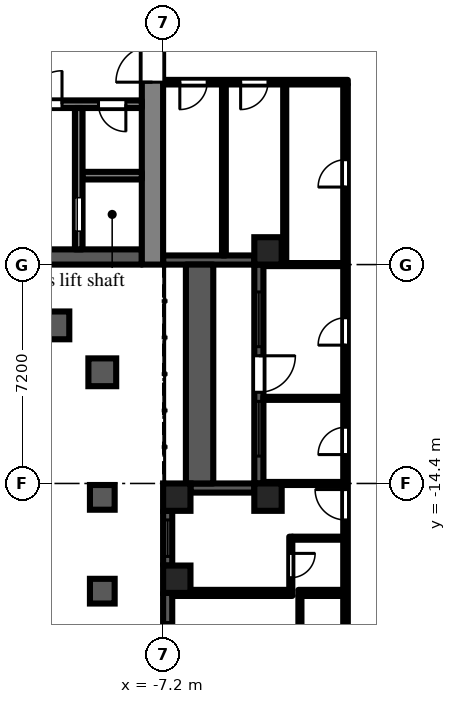
"""IFC4 building model, lengths in metres.
Left out: names, types, materials, properties, quantities, classifications, styles, units other than length and angle.
Written with IfcOpenShell. Run it as: python <this file> out.ifc"""

import sys

from ifc_helpers import new_model, si_unit, direction, frame, frame_2d, origin, origin_2d, place, context, subcontext, project, spatial, rectangle, extrude, element, fill, save


model = new_model("IFC4")
c1 = context("Model", 3, precision=1e-05, world=origin(), true_north=direction((0.0, 1.0)))
c2 = subcontext(c1, "Body", "Model", "MODEL_VIEW")
j1 = project(units=[si_unit("LENGTHUNIT", "METRE"), si_unit("PLANEANGLEUNIT", "RADIAN")], contexts=[c1])
p1 = place(None, origin())
s1 = spatial("IfcSite", under=j1, at=p1, CompositionType="ELEMENT")
p2 = place(p1, origin())
s2 = spatial("IfcBuilding", under=s1, at=p2, CompositionType="ELEMENT")
p3 = place(p2, frame((0.0, 0.0, 59.7)))
s3 = spatial("IfcBuildingStorey", under=s2, at=p3, CompositionType="ELEMENT", Elevation=59.7)
for number, where, z_axis, x_axis in (
    (1, (-6.75, -17.55, 0.0), (0.0, 0.0, 1.0), (1.0, 0.0, 0.0)),
    (2, (-6.75, -14.85, 0.0), (0.0, 0.0, 1.0), (1.0, 0.0, 0.0)),
    (3, (-3.75, -14.85, 0.0), (0.0, 0.0, 1.0), (1.0, 0.0, 0.0)),
    (4, (-3.75, -6.75, 0.0), (0.0, 0.0, 1.0), (1.0, 0.0, 0.0)),
):
    element("IfcColumn", number, at=place(p3, frame(where, z_axis=z_axis, x_axis=x_axis)), inside=s3, PredefinedType="COLUMN", context=c2, shape_type="SweptSolid", body=[
        extrude(rectangle(XDim=0.9, YDim=0.9, at=origin_2d()), origin(), (0.0, 0.0, 1.0), 3.0),
    ])
p4 = place(p3, frame((-7.2, -7.05, 0.0), z_axis=(0.0, 0.0, 1.0), x_axis=(1.0, 0.0, 0.0)))
e5 = element("IfcWall", 5, at=p4, inside=s3, PredefinedType="SOLIDWALL", context=c2, shape_type="SweptSolid", body=[
    extrude(rectangle(XDim=3.0, YDim=0.3, at=frame_2d((1.5, 0.0))), origin(), (0.0, 0.0, 1.0), 2.55),
])
p5 = place(p3, frame((-4.05, -7.2, 0.0), z_axis=(0.0, 0.0, 1.0), x_axis=(0.0, -1.0, 0.0)))
e6 = element("IfcWall", 6, at=p5, inside=s3, PredefinedType="SOLIDWALL", context=c2, shape_type="SweptSolid", body=[
    extrude(rectangle(XDim=7.2, YDim=0.3, at=frame_2d((3.6, 0.0))), origin(), (0.0, 0.0, 1.0), 2.55),
])
p6 = place(p5, frame((3.0, 0.0, 0.0)))
e7 = element("IfcOpeningElement", 7, at=p6, cuts=e6, PredefinedType="OPENING", context=c2, shape_type="SweptSolid", body=[
    extrude(rectangle(XDim=1.2, YDim=2.05, at=frame_2d((0.6, 1.025))), frame((0.0, 0.16, 0.0), z_axis=(0.0, -1.0, 0.0), x_axis=(1.0, 0.0, 0.0)), (0.0, 0.0, 1.0), 0.32),
])
p7 = place(p5, frame((0.9, 0.0, 0.2)))
e8 = element("IfcOpeningElement", 8, at=p7, cuts=e6, PredefinedType="OPENING", context=c2, shape_type="SweptSolid", body=[
    extrude(rectangle(XDim=1.8, YDim=1.85, at=frame_2d((0.9, 0.925))), frame((0.0, 0.16, 0.0), z_axis=(0.0, -1.0, 0.0), x_axis=(1.0, 0.0, 0.0)), (0.0, 0.0, 1.0), 0.32),
])
p8 = place(p5, frame((4.5, 0.0, 0.2)))
e9 = element("IfcOpeningElement", 9, at=p8, cuts=e6, PredefinedType="OPENING", context=c2, shape_type="SweptSolid", body=[
    extrude(rectangle(XDim=1.8, YDim=1.85, at=frame_2d((0.9, 0.925))), frame((0.0, 0.16, 0.0), z_axis=(0.0, -1.0, 0.0), x_axis=(1.0, 0.0, 0.0)), (0.0, 0.0, 1.0), 0.32),
])
p9 = place(p3, frame((-4.2, -14.55, 0.0), z_axis=(0.0, 0.0, 1.0), x_axis=(-1.0, 0.0, 0.0)))
e10 = element("IfcWall", 10, at=p9, inside=s3, PredefinedType="SOLIDWALL", context=c2, shape_type="SweptSolid", body=[
    extrude(rectangle(XDim=2.1, YDim=0.3, at=frame_2d((1.05, 0.0))), origin(), (0.0, 0.0, 1.0), 2.55),
])
p10 = place(p3, frame((-7.05, -15.3, 0.0), z_axis=(0.0, 0.0, 1.0), x_axis=(0.0, -1.0, 0.0)))
e11 = element("IfcWall", 11, at=p10, inside=s3, PredefinedType="SOLIDWALL", context=c2, shape_type="SweptSolid", body=[
    extrude(rectangle(XDim=1.8, YDim=0.3, at=frame_2d((0.9, 0.0))), origin(), (0.0, 0.0, 1.0), 2.1),
])
p11 = place(p10, frame((0.3, 0.0, 0.2)))
e12 = element("IfcOpeningElement", 12, at=p11, cuts=e11, PredefinedType="OPENING", context=c2, shape_type="SweptSolid", body=[
    extrude(rectangle(XDim=1.2, YDim=1.85, at=frame_2d((0.6, 0.925))), frame((0.0, 0.16, 0.0), z_axis=(0.0, -1.0, 0.0), x_axis=(1.0, 0.0, 0.0)), (0.0, 0.0, 1.0), 0.32),
])
p12 = place(p3, frame((-7.05, -18.0, 0.0), z_axis=(0.0, 0.0, 1.0), x_axis=(0.0, -1.0, 0.0)))
e13 = element("IfcWall", 13, at=p12, inside=s3, PredefinedType="SOLIDWALL", context=c2, shape_type="SweptSolid", body=[
    extrude(rectangle(XDim=3.15, YDim=0.3, at=frame_2d((1.575, 0.0))), origin(), (0.0, 0.0, 1.0), 2.1),
])
p13 = place(p12, frame((0.975, 0.0, 0.2)))
e14 = element("IfcOpeningElement", 14, at=p13, cuts=e13, PredefinedType="OPENING", context=c2, shape_type="SweptSolid", body=[
    extrude(rectangle(XDim=1.2, YDim=1.85, at=frame_2d((0.6, 0.925))), frame((0.0, 0.16, 0.0), z_axis=(0.0, -1.0, 0.0), x_axis=(1.0, 0.0, 0.0)), (0.0, 0.0, 1.0), 0.32),
])
p14 = place(p3, frame((-6.0, -14.4, 0.0), z_axis=(0.0, 0.0, 1.0), x_axis=(0.0, 1.0, 0.0)))
e15 = element("IfcWall", 15, at=p14, inside=s3, PredefinedType="PARAPET", context=c2, shape_type="SweptSolid", body=[
    extrude(rectangle(XDim=7.2, YDim=0.9, at=frame_2d((3.6, 0.0))), origin(), (0.0, 0.0, 1.0), 0.8),
])
p15 = place(p3, frame((-7.55, -7.2, 0.0), z_axis=(0.0, 0.0, 1.0), x_axis=(0.0, 1.0, 0.0)))
e16 = element("IfcWall", 16, at=p15, inside=s3, PredefinedType="SHEAR", context=c2, shape_type="SweptSolid", body=[
    extrude(rectangle(XDim=14.4, YDim=0.7, at=frame_2d((7.2, 0.0))), origin(), (0.0, 0.0, 1.0), 2.55),
])
p16 = place(p15, frame((6.0, 0.0, 0.0)))
e17 = element("IfcOpeningElement", 17, at=p16, cuts=e16, PredefinedType="OPENING", context=c2, shape_type="SweptSolid", body=[
    extrude(rectangle(XDim=2.4, YDim=2.2, at=frame_2d((1.2, 1.1))), frame((0.0, 0.36, 0.0), z_axis=(0.0, -1.0, 0.0), x_axis=(1.0, 0.0, 0.0)), (0.0, 0.0, 1.0), 0.72),
])
p17 = place(p3, frame((-7.9, -6.95, 0.0), z_axis=(0.0, 0.0, 1.0), x_axis=(-1.0, 0.0, 0.0)))
e18 = element("IfcWall", 18, at=p17, inside=s3, PredefinedType="SHEAR", context=c2, shape_type="SweptSolid", body=[
    extrude(rectangle(XDim=12.95, YDim=0.5, at=frame_2d((6.475, 0.0))), origin(), (0.0, 0.0, 1.0), 2.55),
])
p18 = place(p3, frame((-7.9, -1.925, 0.0), z_axis=(0.0, 0.0, 1.0), x_axis=(-1.0, 0.0, 0.0)))
e19 = element("IfcWall", 19, at=p18, inside=s3, PredefinedType="SHEAR", context=c2, shape_type="SweptSolid", body=[
    extrude(rectangle(XDim=12.95, YDim=0.25, at=frame_2d((6.475, 0.0))), origin(), (0.0, 0.0, 1.0), 2.55),
])
p19 = place(p18, frame((4.825, 0.0, 0.0)))
e20 = element("IfcOpeningElement", 20, at=p19, cuts=e19, PredefinedType="OPENING", context=c2, shape_type="SweptSolid", body=[
    extrude(rectangle(XDim=1.1, YDim=2.1, at=frame_2d((0.55, 1.05))), frame((0.0, 0.135, 0.0), z_axis=(0.0, -1.0, 0.0), x_axis=(1.0, 0.0, 0.0)), (0.0, 0.0, 1.0), 0.27),
])
p20 = place(p18, frame((7.025, 0.0, 0.0)))
e21 = element("IfcOpeningElement", 21, at=p20, cuts=e19, PredefinedType="OPENING", context=c2, shape_type="SweptSolid", body=[
    extrude(rectangle(XDim=1.1, YDim=2.1, at=frame_2d((0.55, 1.05))), frame((0.0, 0.135, 0.0), z_axis=(0.0, -1.0, 0.0), x_axis=(1.0, 0.0, 0.0)), (0.0, 0.0, 1.0), 0.27),
])
p21 = place(p18, frame((9.225, 0.0, 0.0)))
e22 = element("IfcOpeningElement", 22, at=p21, cuts=e19, PredefinedType="OPENING", context=c2, shape_type="SweptSolid", body=[
    extrude(rectangle(XDim=1.1, YDim=2.1, at=frame_2d((0.55, 1.05))), frame((0.0, 0.135, 0.0), z_axis=(0.0, -1.0, 0.0), x_axis=(1.0, 0.0, 0.0)), (0.0, 0.0, 1.0), 0.27),
])
p22 = place(p18, frame((0.525, 0.0, 0.0)))
e23 = element("IfcOpeningElement", 23, at=p22, cuts=e19, PredefinedType="OPENING", context=c2, shape_type="SweptSolid", body=[
    extrude(rectangle(XDim=0.9, YDim=2.1, at=frame_2d((0.45, 1.05))), frame((0.0, 0.135, 0.0), z_axis=(0.0, -1.0, 0.0), x_axis=(1.0, 0.0, 0.0)), (0.0, 0.0, 1.0), 0.27),
])
p23 = place(p18, frame((2.625, 0.0, 0.0)))
e24 = element("IfcOpeningElement", 24, at=p23, cuts=e19, PredefinedType="OPENING", context=c2, shape_type="SweptSolid", body=[
    extrude(rectangle(XDim=1.1, YDim=2.1, at=frame_2d((0.55, 1.05))), frame((0.0, 0.135, 0.0), z_axis=(0.0, -1.0, 0.0), x_axis=(1.0, 0.0, 0.0)), (0.0, 0.0, 1.0), 0.27),
])
p24 = place(p3, frame((-7.9, -4.275, 0.0), z_axis=(0.0, 0.0, 1.0), x_axis=(-1.0, 0.0, 0.0)))
e25 = element("IfcWall", 25, at=p24, inside=s3, PredefinedType="SHEAR", context=c2, shape_type="SweptSolid", body=[
    extrude(rectangle(XDim=1.95, YDim=0.25, at=frame_2d((0.975, 0.0))), origin(), (0.0, 0.0, 1.0), 2.55),
])
p25 = place(p3, frame((-9.975, -2.05, 0.0), z_axis=(0.0, 0.0, 1.0), x_axis=(0.0, -1.0, 0.0)))
e26 = element("IfcWall", 26, at=p25, inside=s3, PredefinedType="SHEAR", context=c2, shape_type="SweptSolid", body=[
    extrude(rectangle(XDim=4.65, YDim=0.25, at=frame_2d((2.325, 0.0))), origin(), (0.0, 0.0, 1.0), 2.55),
])
p26 = place(p25, frame((2.95, 0.0, 0.0)))
e27 = element("IfcOpeningElement", 27, at=p26, cuts=e26, PredefinedType="OPENING", context=c2, shape_type="SweptSolid", body=[
    extrude(rectangle(XDim=1.1, YDim=2.1, at=frame_2d((0.55, 1.05))), frame((0.0, 0.135, 0.0), z_axis=(0.0, -1.0, 0.0), x_axis=(1.0, 0.0, 0.0)), (0.0, 0.0, 1.0), 0.27),
])
p27 = place(p3, frame((-7.2, -1.2, 0.0), z_axis=(0.0, 0.0, 1.0), x_axis=(1.0, 0.0, 0.0)))
e28 = element("IfcWall", 28, at=p27, inside=s3, PredefinedType="PARTITIONING", context=c2, shape_type="SweptSolid", body=[
    extrude(rectangle(XDim=6.075, YDim=0.15, at=frame_2d((3.038, 0.0))), origin(), (0.0, 0.0, 1.0), 2.55),
])
p28 = place(p27, frame((2.55, 0.0, 0.0)))
e29 = element("IfcOpeningElement", 29, at=p28, cuts=e28, PredefinedType="OPENING", context=c2, shape_type="SweptSolid", body=[
    extrude(rectangle(XDim=0.9, YDim=2.1, at=frame_2d((0.45, 1.05))), frame((0.0, 0.085, 0.0), z_axis=(0.0, -1.0, 0.0), x_axis=(1.0, 0.0, 0.0)), (0.0, 0.0, 1.0), 0.17),
])
p29 = place(p27, frame((0.55, 0.0, 0.0)))
e30 = element("IfcOpeningElement", 30, at=p29, cuts=e28, PredefinedType="OPENING", context=c2, shape_type="SweptSolid", body=[
    extrude(rectangle(XDim=0.9, YDim=2.1, at=frame_2d((0.45, 1.05))), frame((0.0, 0.085, 0.0), z_axis=(0.0, -1.0, 0.0), x_axis=(1.0, 0.0, 0.0)), (0.0, 0.0, 1.0), 0.17),
])
p30 = place(p3, frame((-6.9, -18.0, 0.0), z_axis=(0.0, 0.0, 1.0), x_axis=(1.0, 0.0, 0.0)))
e31 = element("IfcWall", 31, at=p30, inside=s3, PredefinedType="PARTITIONING", context=c2, shape_type="SweptSolid", body=[
    extrude(rectangle(XDim=3.95, YDim=0.2, at=frame_2d((1.975, 0.0))), origin(), (0.0, 0.0, 1.0), 2.55),
])
p31 = place(p3, frame((-5.2, -6.9, 0.0), z_axis=(0.0, 0.0, 1.0), x_axis=(0.0, 1.0, 0.0)))
e32 = element("IfcWall", 32, at=p31, inside=s3, PredefinedType="PARTITIONING", context=c2, shape_type="SweptSolid", body=[
    extrude(rectangle(XDim=5.625, YDim=0.125, at=frame_2d((2.812, 0.0))), origin(), (0.0, 0.0, 1.0), 2.55),
])
for number, where, z_axis, x_axis in (
    (33, (-3.9, -14.4, 0.0), (0.0, 0.0, 1.0), (1.0, 0.0, 0.0)),
    (34, (-3.9, -11.6, 0.0), (0.0, 0.0, 1.0), (1.0, 0.0, 0.0)),
    (35, (-3.9, -7.2, 0.0), (0.0, 0.0, 1.0), (1.0, 0.0, 0.0)),
):
    element("IfcWall", number, at=place(p3, frame(where, z_axis=z_axis, x_axis=x_axis)), inside=s3, PredefinedType="PARTITIONING", context=c2, shape_type="SweptSolid", body=[
        extrude(rectangle(XDim=2.625, YDim=0.1, at=frame_2d((1.312, 0.0))), origin(), (0.0, 0.0, 1.0), 2.55),
    ])
p32 = place(p3, frame((-3.2, -7.15, 0.0), z_axis=(0.0, 0.0, 1.0), x_axis=(0.0, 1.0, 0.0)))
e36 = element("IfcWall", 36, at=p32, inside=s3, PredefinedType="PARTITIONING", context=c2, shape_type="SweptSolid", body=[
    extrude(rectangle(XDim=5.875, YDim=0.1, at=frame_2d((2.938, 0.0))), origin(), (0.0, 0.0, 1.0), 2.55),
])
p33 = place(p3, frame((-3.0, -17.9, 0.0), z_axis=(0.0, 0.0, 1.0), x_axis=(0.0, 1.0, 0.0)))
e37 = element("IfcWall", 37, at=p33, inside=s3, PredefinedType="PARTITIONING", context=c2, shape_type="SweptSolid", body=[
    extrude(rectangle(XDim=1.75, YDim=0.1, at=frame_2d((0.875, 0.0))), origin(), (0.0, 0.0, 1.0), 2.55),
])
p34 = place(p33, frame((0.4, 0.0, 0.0)))
e38 = element("IfcOpeningElement", 38, at=p34, cuts=e37, PredefinedType="OPENING", context=c2, shape_type="SweptSolid", body=[
    extrude(rectangle(XDim=0.8, YDim=2.1, at=frame_2d((0.4, 1.05))), frame((0.0, 0.06, 0.0), z_axis=(0.0, -1.0, 0.0), x_axis=(1.0, 0.0, 0.0)), (0.0, 0.0, 1.0), 0.12),
])
p35 = place(p3, frame((-2.95, -16.2, 0.0), z_axis=(0.0, 0.0, 1.0), x_axis=(1.0, 0.0, 0.0)))
e39 = element("IfcWall", 39, at=p35, inside=s3, PredefinedType="PARTITIONING", context=c2, shape_type="SweptSolid", body=[
    extrude(rectangle(XDim=1.675, YDim=0.1, at=frame_2d((0.837, 0.0))), origin(), (0.0, 0.0, 1.0), 2.55),
])
p36 = place(p3, frame((-2.7, -32.35, 0.0), z_axis=(0.0, 0.0, 1.0), x_axis=(0.0, 1.0, 0.0)))
e40 = element("IfcWall", 40, at=p36, inside=s3, PredefinedType="PARTITIONING", context=c2, shape_type="SweptSolid", body=[
    extrude(rectangle(XDim=14.25, YDim=0.1, at=frame_2d((7.125, 0.0))), origin(), (0.0, 0.0, 1.0), 2.55),
])
p37 = place(p36, frame((3.28, 0.0, 0.0)))
e41 = element("IfcOpeningElement", 41, at=p37, cuts=e40, PredefinedType="OPENING", context=c2, shape_type="SweptSolid", body=[
    extrude(rectangle(XDim=0.9, YDim=2.1, at=frame_2d((0.45, 1.05))), frame((0.0, 0.06, 0.0), z_axis=(0.0, -1.0, 0.0), x_axis=(1.0, 0.0, 0.0)), (0.0, 0.0, 1.0), 0.12),
])
p38 = place(p36, frame((10.12, 0.0, 0.0)))
e42 = element("IfcOpeningElement", 42, at=p38, cuts=e40, PredefinedType="OPENING", context=c2, shape_type="SweptSolid", body=[
    extrude(rectangle(XDim=0.9, YDim=2.1, at=frame_2d((0.45, 1.05))), frame((0.0, 0.06, 0.0), z_axis=(0.0, -1.0, 0.0), x_axis=(1.0, 0.0, 0.0)), (0.0, 0.0, 1.0), 0.12),
])
p39 = place(p3, frame((-2.75, -18.0, 0.0), z_axis=(0.0, 0.0, 1.0), x_axis=(1.0, 0.0, 0.0)))
e43 = element("IfcWall", 43, at=p39, inside=s3, PredefinedType="PARTITIONING", context=c2, shape_type="SweptSolid", body=[
    extrude(rectangle(XDim=1.475, YDim=0.2, at=frame_2d((0.738, 0.0))), origin(), (0.0, 0.0, 1.0), 2.55),
])
p40 = place(p3, frame((-1.2, -36.5, 0.0), z_axis=(0.0, 0.0, 1.0), x_axis=(0.0, 1.0, 0.0)))
e44 = element("IfcWall", 44, at=p40, inside=s3, PredefinedType="PARTITIONING", context=c2, shape_type="SweptSolid", body=[
    extrude(rectangle(XDim=35.225, YDim=0.15, at=frame_2d((17.613, 0.0))), origin(), (0.0, 0.0, 1.0), 2.55),
])
p41 = place(p40, frame((31.85, 0.0, 0.0)))
e45 = element("IfcOpeningElement", 45, at=p41, cuts=e44, PredefinedType="OPENING", context=c2, shape_type="SweptSolid", body=[
    extrude(rectangle(XDim=0.9, YDim=2.1, at=frame_2d((0.45, 1.05))), frame((0.0, 0.085, 0.0), z_axis=(0.0, -1.0, 0.0), x_axis=(1.0, 0.0, 0.0)), (0.0, 0.0, 1.0), 0.17),
])
p42 = place(p40, frame((23.05, 0.0, 0.0)))
e46 = element("IfcOpeningElement", 46, at=p42, cuts=e44, PredefinedType="OPENING", context=c2, shape_type="SweptSolid", body=[
    extrude(rectangle(XDim=0.9, YDim=2.1, at=frame_2d((0.45, 1.05))), frame((0.0, 0.085, 0.0), z_axis=(0.0, -1.0, 0.0), x_axis=(1.0, 0.0, 0.0)), (0.0, 0.0, 1.0), 0.17),
])
p43 = place(p40, frame((26.65, 0.0, 0.0)))
e47 = element("IfcOpeningElement", 47, at=p43, cuts=e44, PredefinedType="OPENING", context=c2, shape_type="SweptSolid", body=[
    extrude(rectangle(XDim=0.9, YDim=2.1, at=frame_2d((0.45, 1.05))), frame((0.0, 0.085, 0.0), z_axis=(0.0, -1.0, 0.0), x_axis=(1.0, 0.0, 0.0)), (0.0, 0.0, 1.0), 0.17),
])
p44 = place(p40, frame((20.9, 0.0, 0.0)))
e48 = element("IfcOpeningElement", 48, at=p44, cuts=e44, PredefinedType="OPENING", context=c2, shape_type="SweptSolid", body=[
    extrude(rectangle(XDim=1.0, YDim=2.1, at=frame_2d((0.5, 1.05))), frame((0.0, 0.085, 0.0), z_axis=(0.0, -1.0, 0.0), x_axis=(1.0, 0.0, 0.0)), (0.0, 0.0, 1.0), 0.17),
])
p45 = place(p40, frame((1.55, 0.0, 0.0)))
e49 = element("IfcOpeningElement", 49, at=p45, cuts=e44, PredefinedType="OPENING", context=c2, shape_type="SweptSolid", body=[
    extrude(rectangle(XDim=1.0, YDim=2.1, at=frame_2d((0.5, 1.05))), frame((0.0, 0.085, 0.0), z_axis=(0.0, -1.0, 0.0), x_axis=(1.0, 0.0, 0.0)), (0.0, 0.0, 1.0), 0.17),
])
p46 = place(p6, origin())
e50 = element("IfcDoor", 50, at=p46, inside=s3, OperationType="SINGLE_SWING_LEFT", PredefinedType="DOOR", context=c2, shape_type="SweptSolid", body=[
    extrude(rectangle(XDim=1.2, YDim=2.05, at=frame_2d((0.6, 1.025))), frame((0.0, 0.025, 0.0), z_axis=(0.0, -1.0, 0.0), x_axis=(1.0, 0.0, 0.0)), (0.0, 0.0, 1.0), 0.05),
])
fill(e7, e50)
p47 = place(p7, origin())
e51 = element("IfcWindow", 51, at=p47, inside=s3, PartitioningType="SINGLE_PANEL", PredefinedType="WINDOW", context=c2, shape_type="SweptSolid", body=[
    extrude(rectangle(XDim=1.8, YDim=1.85, at=frame_2d((0.9, 0.925))), frame((0.0, 0.03, 0.0), z_axis=(0.0, -1.0, 0.0), x_axis=(1.0, 0.0, 0.0)), (0.0, 0.0, 1.0), 0.06),
])
fill(e8, e51)
p48 = place(p8, origin())
e52 = element("IfcWindow", 52, at=p48, inside=s3, PartitioningType="SINGLE_PANEL", PredefinedType="WINDOW", context=c2, shape_type="SweptSolid", body=[
    extrude(rectangle(XDim=1.8, YDim=1.85, at=frame_2d((0.9, 0.925))), frame((0.0, 0.03, 0.0), z_axis=(0.0, -1.0, 0.0), x_axis=(1.0, 0.0, 0.0)), (0.0, 0.0, 1.0), 0.06),
])
fill(e9, e52)
p49 = place(p11, origin())
e53 = element("IfcWindow", 53, at=p49, inside=s3, PartitioningType="SINGLE_PANEL", PredefinedType="WINDOW", context=c2, shape_type="SweptSolid", body=[
    extrude(rectangle(XDim=1.2, YDim=1.85, at=frame_2d((0.6, 0.925))), frame((0.0, 0.03, 0.0), z_axis=(0.0, -1.0, 0.0), x_axis=(1.0, 0.0, 0.0)), (0.0, 0.0, 1.0), 0.06),
])
fill(e12, e53)
p50 = place(p13, origin())
e54 = element("IfcWindow", 54, at=p50, inside=s3, PartitioningType="SINGLE_PANEL", PredefinedType="WINDOW", context=c2, shape_type="SweptSolid", body=[
    extrude(rectangle(XDim=1.2, YDim=1.85, at=frame_2d((0.6, 0.925))), frame((0.0, 0.03, 0.0), z_axis=(0.0, -1.0, 0.0), x_axis=(1.0, 0.0, 0.0)), (0.0, 0.0, 1.0), 0.06),
])
fill(e14, e54)
p51 = place(p26, origin())
e55 = element("IfcDoor", 55, at=p51, inside=s3, OperationType="SLIDING_TO_LEFT", PredefinedType="DOOR", context=c2, shape_type="SweptSolid", body=[
    extrude(rectangle(XDim=1.1, YDim=2.1, at=frame_2d((0.55, 1.05))), frame((0.0, 0.025, 0.0), z_axis=(0.0, -1.0, 0.0), x_axis=(1.0, 0.0, 0.0)), (0.0, 0.0, 1.0), 0.05),
])
fill(e27, e55)
p52 = place(p22, origin())
e56 = element("IfcDoor", 56, at=p52, inside=s3, OperationType="SINGLE_SWING_LEFT", PredefinedType="DOOR", context=c2, shape_type="SweptSolid", body=[
    extrude(rectangle(XDim=0.9, YDim=2.1, at=frame_2d((0.45, 1.05))), frame((0.0, 0.025, 0.0), z_axis=(0.0, -1.0, 0.0), x_axis=(1.0, 0.0, 0.0)), (0.0, 0.0, 1.0), 0.05),
])
fill(e23, e56)
p53 = place(p23, frame((1.1, 0.0, 0.0), z_axis=(0.0, 0.0, 1.0), x_axis=(-1.0, 0.0, 0.0)))
e57 = element("IfcDoor", 57, at=p53, inside=s3, OperationType="SINGLE_SWING_RIGHT", PredefinedType="DOOR", context=c2, shape_type="SweptSolid", body=[
    extrude(rectangle(XDim=1.1, YDim=2.1, at=frame_2d((0.55, 1.05))), frame((0.0, 0.025, 0.0), z_axis=(0.0, -1.0, 0.0), x_axis=(1.0, 0.0, 0.0)), (0.0, 0.0, 1.0), 0.05),
])
fill(e24, e57)
p54 = place(p16, origin())
e58 = element("IfcDoor", 58, at=p54, inside=s3, OperationType="DOUBLE_DOOR_DOUBLE_SWING", PredefinedType="DOOR", context=c2, shape_type="SweptSolid", body=[
    extrude(rectangle(XDim=2.4, YDim=2.2, at=frame_2d((1.2, 1.1))), frame((0.0, 0.025, 0.0), z_axis=(0.0, -1.0, 0.0), x_axis=(1.0, 0.0, 0.0)), (0.0, 0.0, 1.0), 0.05),
])
fill(e17, e58)
p55 = place(p41, origin())
e59 = element("IfcDoor", 59, at=p55, inside=s3, OperationType="SINGLE_SWING_LEFT", PredefinedType="DOOR", context=c2, shape_type="SweptSolid", body=[
    extrude(rectangle(XDim=0.9, YDim=2.1, at=frame_2d((0.45, 1.05))), frame((0.0, 0.025, 0.0), z_axis=(0.0, -1.0, 0.0), x_axis=(1.0, 0.0, 0.0)), (0.0, 0.0, 1.0), 0.05),
])
fill(e45, e59)
p56 = place(p28, frame((0.9, 0.0, 0.0), z_axis=(0.0, 0.0, 1.0), x_axis=(-1.0, 0.0, 0.0)))
e60 = element("IfcDoor", 60, at=p56, inside=s3, OperationType="SINGLE_SWING_RIGHT", PredefinedType="DOOR", context=c2, shape_type="SweptSolid", body=[
    extrude(rectangle(XDim=0.9, YDim=2.1, at=frame_2d((0.45, 1.05))), frame((0.0, 0.025, 0.0), z_axis=(0.0, -1.0, 0.0), x_axis=(1.0, 0.0, 0.0)), (0.0, 0.0, 1.0), 0.05),
])
fill(e29, e60)
p57 = place(p29, frame((0.9, 0.0, 0.0), z_axis=(0.0, 0.0, 1.0), x_axis=(-1.0, 0.0, 0.0)))
e61 = element("IfcDoor", 61, at=p57, inside=s3, OperationType="SINGLE_SWING_RIGHT", PredefinedType="DOOR", context=c2, shape_type="SweptSolid", body=[
    extrude(rectangle(XDim=0.9, YDim=2.1, at=frame_2d((0.45, 1.05))), frame((0.0, 0.025, 0.0), z_axis=(0.0, -1.0, 0.0), x_axis=(1.0, 0.0, 0.0)), (0.0, 0.0, 1.0), 0.05),
])
fill(e30, e61)
p58 = place(p42, origin())
e62 = element("IfcDoor", 62, at=p58, inside=s3, OperationType="SINGLE_SWING_LEFT", PredefinedType="DOOR", context=c2, shape_type="SweptSolid", body=[
    extrude(rectangle(XDim=0.9, YDim=2.1, at=frame_2d((0.45, 1.05))), frame((0.0, 0.025, 0.0), z_axis=(0.0, -1.0, 0.0), x_axis=(1.0, 0.0, 0.0)), (0.0, 0.0, 1.0), 0.05),
])
fill(e46, e62)
p59 = place(p43, origin())
e63 = element("IfcDoor", 63, at=p59, inside=s3, OperationType="SINGLE_SWING_LEFT", PredefinedType="DOOR", context=c2, shape_type="SweptSolid", body=[
    extrude(rectangle(XDim=0.9, YDim=2.1, at=frame_2d((0.45, 1.05))), frame((0.0, 0.025, 0.0), z_axis=(0.0, -1.0, 0.0), x_axis=(1.0, 0.0, 0.0)), (0.0, 0.0, 1.0), 0.05),
])
fill(e47, e63)
p60 = place(p34, frame((0.8, 0.0, 0.0), z_axis=(0.0, 0.0, 1.0), x_axis=(-1.0, 0.0, 0.0)))
e64 = element("IfcDoor", 64, at=p60, inside=s3, OperationType="SINGLE_SWING_LEFT", PredefinedType="DOOR", context=c2, shape_type="SweptSolid", body=[
    extrude(rectangle(XDim=0.8, YDim=2.1, at=frame_2d((0.4, 1.05))), frame((0.0, 0.025, 0.0), z_axis=(0.0, -1.0, 0.0), x_axis=(1.0, 0.0, 0.0)), (0.0, 0.0, 1.0), 0.05),
])
fill(e38, e64)
p61 = place(p44, origin())
e65 = element("IfcDoor", 65, at=p61, inside=s3, OperationType="SINGLE_SWING_RIGHT", PredefinedType="DOOR", context=c2, shape_type="SweptSolid", body=[
    extrude(rectangle(XDim=1.0, YDim=2.1, at=frame_2d((0.5, 1.05))), frame((0.0, 0.025, 0.0), z_axis=(0.0, -1.0, 0.0), x_axis=(1.0, 0.0, 0.0)), (0.0, 0.0, 1.0), 0.05),
])
fill(e48, e65)
save(model, sys.argv[1])
